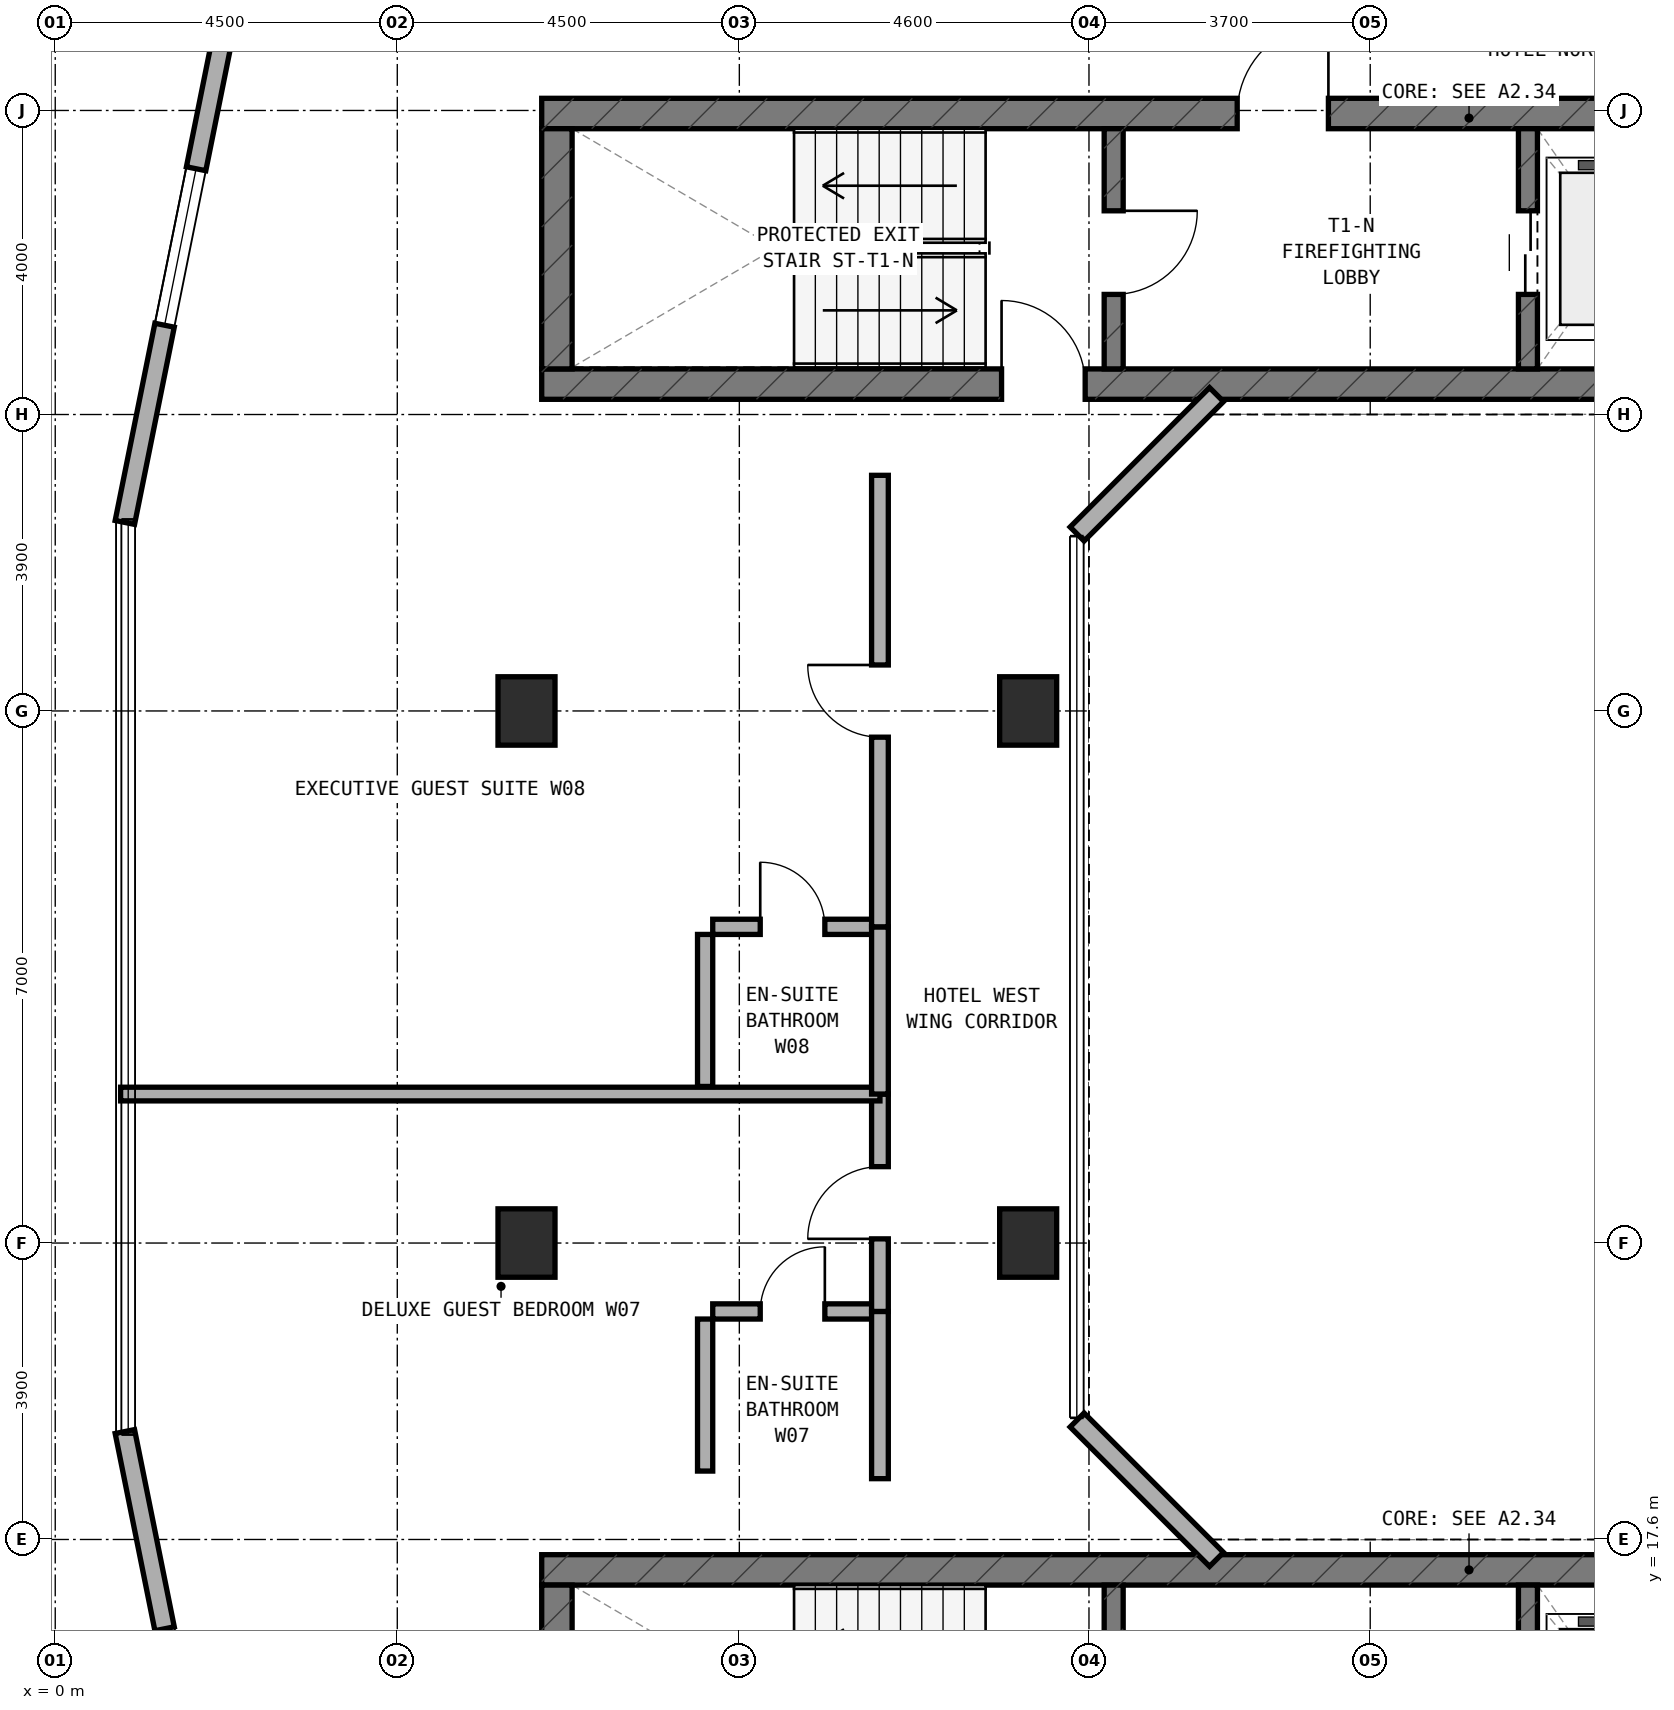
"""IFC4 building model, lengths in metres.
Left out: names, types, materials, properties, quantities, classifications, styles, units other than length and angle.
Written with IfcOpenShell. Run it as: python <this file> out.ifc"""

import sys

from ifc_helpers import new_model, si_unit, direction, frame, frame_2d, origin, origin_2d, place, context, subcontext, project, spatial, rectangle, extrude, element, fill, save


model = new_model("IFC4")
c1 = context("Model", 3, precision=1e-05, world=origin(), true_north=direction((0.0, 1.0)))
c2 = subcontext(c1, "Body", "Model", "MODEL_VIEW")
j1 = project(units=[si_unit("LENGTHUNIT", "METRE"), si_unit("PLANEANGLEUNIT", "RADIAN")], contexts=[c1])
p1 = place(None, origin())
s1 = spatial("IfcSite", under=j1, at=p1, CompositionType="ELEMENT")
p2 = place(p1, origin())
s2 = spatial("IfcBuilding", under=s1, at=p2, CompositionType="ELEMENT")
p3 = place(p2, frame((0.0, 0.0, 152.0)))
s3 = spatial("IfcBuildingStorey", under=s2, at=p3, CompositionType="ELEMENT", Elevation=152.0)
p4 = place(p3, frame((6.4, 32.8, 0.0), z_axis=(0.0, 0.0, 1.0), x_axis=(1.0, 0.0, 0.0)))
e1 = element("IfcWall", 1, at=p4, inside=s3, PredefinedType="SHEAR", context=c2, shape_type="SweptSolid", body=[
    extrude(rectangle(XDim=24.4, YDim=0.4, at=frame_2d((12.2, 0.0))), origin(), (0.0, 0.0, 1.0), 3.5),
])
p5 = place(p4, frame((6.05, 0.0, 0.0)))
e2 = element("IfcOpeningElement", 2, at=p5, cuts=e1, PredefinedType="OPENING", context=c2, shape_type="SweptSolid", body=[
    extrude(rectangle(XDim=1.1, YDim=2.15, at=frame_2d((0.55, 1.075))), frame((0.0, 0.21, 0.0), z_axis=(0.0, -1.0, 0.0), x_axis=(1.0, 0.0, 0.0)), (0.0, 0.0, 1.0), 0.42),
])
p6 = place(p3, frame((6.4, 36.36, 0.0), z_axis=(0.0, 0.0, 1.0), x_axis=(1.0, 0.0, 0.0)))
e3 = element("IfcWall", 3, at=p6, inside=s3, PredefinedType="SHEAR", context=c2, shape_type="SweptSolid", body=[
    extrude(rectangle(XDim=24.4, YDim=0.4, at=frame_2d((12.2, 0.0))), origin(), (0.0, 0.0, 1.0), 3.5),
])
p7 = place(p6, frame((9.15, 0.0, 0.0)))
e4 = element("IfcOpeningElement", 4, at=p7, cuts=e3, PredefinedType="OPENING", context=c2, shape_type="SweptSolid", body=[
    extrude(rectangle(XDim=1.2, YDim=2.15, at=frame_2d((0.6, 1.075))), frame((0.0, 0.21, 0.0), z_axis=(0.0, -1.0, 0.0), x_axis=(1.0, 0.0, 0.0)), (0.0, 0.0, 1.0), 0.42),
])
p8 = place(p6, frame((19.2, 0.0, 0.0)))
e5 = element("IfcOpeningElement", 5, at=p8, cuts=e3, PredefinedType="OPENING", context=c2, shape_type="SweptSolid", body=[
    extrude(rectangle(XDim=0.85, YDim=2.1, at=frame_2d((0.425, 1.05))), frame((0.0, 0.21, 0.0), z_axis=(0.0, -1.0, 0.0), x_axis=(1.0, 0.0, 0.0)), (0.0, 0.0, 1.0), 0.42),
])
p9 = place(p6, frame((16.94, 0.0, 0.0)))
e6 = element("IfcOpeningElement", 6, at=p9, cuts=e3, PredefinedType="OPENING", context=c2, shape_type="SweptSolid", body=[
    extrude(rectangle(XDim=0.85, YDim=2.1, at=frame_2d((0.425, 1.05))), frame((0.0, 0.21, 0.0), z_axis=(0.0, -1.0, 0.0), x_axis=(1.0, 0.0, 0.0)), (0.0, 0.0, 1.0), 0.42),
])
p10 = place(p3, frame((6.6, 33.0, 0.0), z_axis=(0.0, 0.0, 1.0), x_axis=(0.0, 1.0, 0.0)))
e7 = element("IfcWall", 7, at=p10, inside=s3, PredefinedType="SHEAR", context=c2, shape_type="SweptSolid", body=[
    extrude(rectangle(XDim=3.16, YDim=0.4, at=frame_2d((1.58, 0.0))), origin(), (0.0, 0.0, 1.0), 3.5),
])
p11 = place(p3, frame((13.925, 33.0, 0.0), z_axis=(0.0, 0.0, 1.0), x_axis=(0.0, 1.0, 0.0)))
e8 = element("IfcWall", 8, at=p11, inside=s3, PredefinedType="STANDARD", context=c2, shape_type="SweptSolid", body=[
    extrude(rectangle(XDim=3.16, YDim=0.25, at=frame_2d((1.58, 0.0))), origin(), (0.0, 0.0, 1.0), 3.22),
])
p12 = place(p11, frame((0.98, 0.0, 0.0)))
e9 = element("IfcOpeningElement", 9, at=p12, cuts=e8, PredefinedType="OPENING", context=c2, shape_type="SweptSolid", body=[
    extrude(rectangle(XDim=1.1, YDim=2.15, at=frame_2d((0.55, 1.075))), frame((0.0, 0.135, 0.0), z_axis=(0.0, -1.0, 0.0), x_axis=(1.0, 0.0, 0.0)), (0.0, 0.0, 1.0), 0.27),
])
p13 = place(p3, frame((19.375, 33.0, 0.0), z_axis=(0.0, 0.0, 1.0), x_axis=(0.0, 1.0, 0.0)))
e10 = element("IfcWall", 10, at=p13, inside=s3, PredefinedType="STANDARD", context=c2, shape_type="SweptSolid", body=[
    extrude(rectangle(XDim=3.16, YDim=0.25, at=frame_2d((1.58, 0.0))), origin(), (0.0, 0.0, 1.0), 3.22),
])
p14 = place(p13, frame((0.98, 0.0, 0.0)))
e11 = element("IfcOpeningElement", 11, at=p14, cuts=e10, PredefinedType="OPENING", context=c2, shape_type="SweptSolid", body=[
    extrude(rectangle(XDim=1.1, YDim=2.15, at=frame_2d((0.55, 1.075))), frame((0.0, 0.135, 0.0), z_axis=(0.0, -1.0, 0.0), x_axis=(1.0, 0.0, 0.0)), (0.0, 0.0, 1.0), 0.27),
])
p15 = place(p3, frame((6.4, 17.2, 0.0), z_axis=(0.0, 0.0, 1.0), x_axis=(1.0, 0.0, 0.0)))
e12 = element("IfcWall", 12, at=p15, inside=s3, PredefinedType="SHEAR", context=c2, shape_type="SweptSolid", body=[
    extrude(rectangle(XDim=24.4, YDim=0.4, at=frame_2d((12.2, 0.0))), origin(), (0.0, 0.0, 1.0), 3.5),
])
p16 = place(p3, frame((6.6, 13.84, 0.0), z_axis=(0.0, 0.0, 1.0), x_axis=(0.0, 1.0, 0.0)))
e13 = element("IfcWall", 13, at=p16, inside=s3, PredefinedType="SHEAR", context=c2, shape_type="SweptSolid", body=[
    extrude(rectangle(XDim=3.16, YDim=0.4, at=frame_2d((1.58, 0.0))), origin(), (0.0, 0.0, 1.0), 3.5),
])
p17 = place(p3, frame((13.925, 13.84, 0.0), z_axis=(0.0, 0.0, 1.0), x_axis=(0.0, 1.0, 0.0)))
e14 = element("IfcWall", 14, at=p17, inside=s3, PredefinedType="STANDARD", context=c2, shape_type="SweptSolid", body=[
    extrude(rectangle(XDim=3.16, YDim=0.25, at=frame_2d((1.58, 0.0))), origin(), (0.0, 0.0, 1.0), 3.22),
])
p18 = place(p17, frame((0.98, 0.0, 0.0)))
e15 = element("IfcOpeningElement", 15, at=p18, cuts=e14, PredefinedType="OPENING", context=c2, shape_type="SweptSolid", body=[
    extrude(rectangle(XDim=1.1, YDim=2.15, at=frame_2d((0.55, 1.075))), frame((0.0, 0.135, 0.0), z_axis=(0.0, -1.0, 0.0), x_axis=(1.0, 0.0, 0.0)), (0.0, 0.0, 1.0), 0.27),
])
p19 = place(p3, frame((19.375, 13.84, 0.0), z_axis=(0.0, 0.0, 1.0), x_axis=(0.0, 1.0, 0.0)))
e16 = element("IfcWall", 16, at=p19, inside=s3, PredefinedType="STANDARD", context=c2, shape_type="SweptSolid", body=[
    extrude(rectangle(XDim=3.16, YDim=0.25, at=frame_2d((1.58, 0.0))), origin(), (0.0, 0.0, 1.0), 3.22),
])
p20 = place(p19, frame((0.98, 0.0, 0.0)))
e17 = element("IfcOpeningElement", 17, at=p20, cuts=e16, PredefinedType="OPENING", context=c2, shape_type="SweptSolid", body=[
    extrude(rectangle(XDim=1.1, YDim=2.15, at=frame_2d((0.55, 1.075))), frame((0.0, 0.135, 0.0), z_axis=(0.0, -1.0, 0.0), x_axis=(1.0, 0.0, 0.0)), (0.0, 0.0, 1.0), 0.27),
])
for number, where, z_axis, x_axis in (
    (18, (6.2, 21.5, 0.0), (0.0, 0.0, 1.0), (1.0, 0.0, 0.0)),
    (19, (6.2, 28.5, 0.0), (0.0, 0.0, 1.0), (1.0, 0.0, 0.0)),
    (20, (12.8, 21.5, 0.0), (0.0, 0.0, 1.0), (1.0, 0.0, 0.0)),
    (21, (12.8, 28.5, 0.0), (0.0, 0.0, 1.0), (1.0, 0.0, 0.0)),
):
    element("IfcColumn", number, at=place(p3, frame(where, z_axis=z_axis, x_axis=x_axis)), inside=s3, PredefinedType="COLUMN", context=c2, shape_type="SweptSolid", body=[
        extrude(rectangle(XDim=0.75, YDim=0.9, at=origin_2d()), origin(), (0.0, 0.0, 1.0), 3.5),
    ])
p21 = place(p3, frame((2.729, 39.982, 0.0), z_axis=(0.0, 0.0, 1.0), x_axis=(-0.197435082048, -0.980315963543, 0.0)))
e22 = element("IfcWall", 22, at=p21, inside=s3, PredefinedType="STANDARD", context=c2, shape_type="SweptSolid", body=[
    extrude(rectangle(XDim=9.183, YDim=0.26, at=frame_2d((4.591, 0.0))), origin(), (0.0, 0.0, 1.0), 3.22),
])
p22 = place(p21, frame((4.436, 0.0, 0.85)))
e23 = element("IfcOpeningElement", 23, at=p22, cuts=e22, PredefinedType="OPENING", context=c2, shape_type="SweptSolid", body=[
    extrude(rectangle(XDim=2.1, YDim=1.5, at=frame_2d((1.05, 0.75))), frame((0.0, 0.14, 0.0), z_axis=(0.0, -1.0, 0.0), x_axis=(1.0, 0.0, 0.0)), (0.0, 0.0, 1.0), 0.28),
])
p23 = place(p3, frame((0.916, 19.02, 0.0), z_axis=(0.0, 0.0, 1.0), x_axis=(0.197435082048, -0.980315963543, 0.0)))
e24 = element("IfcWall", 24, at=p23, inside=s3, PredefinedType="STANDARD", context=c2, shape_type="SweptSolid", body=[
    extrude(rectangle(XDim=9.183, YDim=0.26, at=frame_2d((4.591, 0.0))), origin(), (0.0, 0.0, 1.0), 3.22),
])
p24 = place(p23, frame((2.647, 0.0, 0.85)))
e25 = element("IfcOpeningElement", 25, at=p24, cuts=e24, PredefinedType="OPENING", context=c2, shape_type="SweptSolid", body=[
    extrude(rectangle(XDim=2.1, YDim=1.5, at=frame_2d((1.05, 0.75))), frame((0.0, 0.14, 0.0), z_axis=(0.0, -1.0, 0.0), x_axis=(1.0, 0.0, 0.0)), (0.0, 0.0, 1.0), 0.28),
])
for number, where, z_axis, x_axis in (
    (26, (15.278, 32.662, 0.0), (0.0, 0.0, 1.0), (-0.707, -0.707, 0.0)),
    (27, (13.444, 19.172, 0.0), (0.0, 0.0, 1.0), (0.707, -0.707, 0.0)),
):
    element("IfcWall", number, at=place(p3, frame(where, z_axis=z_axis, x_axis=x_axis)), inside=s3, PredefinedType="STANDARD", context=c2, shape_type="SweptSolid", body=[
        extrude(rectangle(XDim=2.594, YDim=0.26, at=frame_2d((1.297, 0.0))), origin(), (0.0, 0.0, 1.0), 3.22),
    ])
p25 = place(p3, frame((8.65, 20.6, 0.0), z_axis=(0.0, 0.0, 1.0), x_axis=(1.0, 0.0, 0.0)))
e28 = element("IfcWall", 28, at=p25, inside=s3, PredefinedType="PLUMBINGWALL", context=c2, shape_type="SweptSolid", body=[
    extrude(rectangle(XDim=2.1, YDim=0.2, at=frame_2d((1.05, 0.0))), origin(), (0.0, 0.0, 1.0), 3.22),
])
p26 = place(p25, frame((0.625, 0.0, 0.0)))
e29 = element("IfcOpeningElement", 29, at=p26, cuts=e28, PredefinedType="OPENING", context=c2, shape_type="SweptSolid", body=[
    extrude(rectangle(XDim=0.85, YDim=2.1, at=frame_2d((0.425, 1.05))), frame((0.0, 0.11, 0.0), z_axis=(0.0, -1.0, 0.0), x_axis=(1.0, 0.0, 0.0)), (0.0, 0.0, 1.0), 0.22),
])
p27 = place(p3, frame((8.55, 18.5, 0.0), z_axis=(0.0, 0.0, 1.0), x_axis=(0.0, 1.0, 0.0)))
e30 = element("IfcWall", 30, at=p27, inside=s3, PredefinedType="PLUMBINGWALL", context=c2, shape_type="SweptSolid", body=[
    extrude(rectangle(XDim=2.0, YDim=0.2, at=frame_2d((1.0, 0.0))), origin(), (0.0, 0.0, 1.0), 3.22),
])
p28 = place(p3, frame((10.85, 18.4, 0.0), z_axis=(0.0, 0.0, 1.0), x_axis=(0.0, 1.0, 0.0)))
e31 = element("IfcWall", 31, at=p28, inside=s3, PredefinedType="SOLIDWALL", context=c2, shape_type="SweptSolid", body=[
    extrude(rectangle(XDim=2.2, YDim=0.22, at=frame_2d((1.1, 0.0))), origin(), (0.0, 0.0, 1.0), 3.22),
])
p29 = place(p3, frame((10.85, 20.6, 0.0), z_axis=(0.0, 0.0, 1.0), x_axis=(0.0, 1.0, 0.0)))
e32 = element("IfcWall", 32, at=p29, inside=s3, PredefinedType="SOLIDWALL", context=c2, shape_type="SweptSolid", body=[
    extrude(rectangle(XDim=2.86, YDim=0.22, at=frame_2d((1.43, 0.0))), origin(), (0.0, 0.0, 1.0), 2.795),
])
p30 = place(p29, frame((0.955, 0.0, 0.0)))
e33 = element("IfcOpeningElement", 33, at=p30, cuts=e32, PredefinedType="OPENING", context=c2, shape_type="SweptSolid", body=[
    extrude(rectangle(XDim=0.95, YDim=2.1, at=frame_2d((0.475, 1.05))), frame((0.0, 0.12, 0.0), z_axis=(0.0, -1.0, 0.0), x_axis=(1.0, 0.0, 0.0)), (0.0, 0.0, 1.0), 0.24),
])
p31 = place(p3, frame((0.86, 23.46, 0.0), z_axis=(0.0, 0.0, 1.0), x_axis=(1.0, 0.0, 0.0)))
e34 = element("IfcWall", 34, at=p31, inside=s3, PredefinedType="SOLIDWALL", context=c2, shape_type="SweptSolid", body=[
    extrude(rectangle(XDim=9.99, YDim=0.18, at=frame_2d((4.995, 0.0))), origin(), (0.0, 0.0, 1.0), 2.835),
])
p32 = place(p3, frame((8.65, 25.66, 0.0), z_axis=(0.0, 0.0, 1.0), x_axis=(1.0, 0.0, 0.0)))
e35 = element("IfcWall", 35, at=p32, inside=s3, PredefinedType="PLUMBINGWALL", context=c2, shape_type="SweptSolid", body=[
    extrude(rectangle(XDim=2.1, YDim=0.2, at=frame_2d((1.05, 0.0))), origin(), (0.0, 0.0, 1.0), 3.22),
])
p33 = place(p32, frame((0.625, 0.0, 0.0)))
e36 = element("IfcOpeningElement", 36, at=p33, cuts=e35, PredefinedType="OPENING", context=c2, shape_type="SweptSolid", body=[
    extrude(rectangle(XDim=0.85, YDim=2.1, at=frame_2d((0.425, 1.05))), frame((0.0, 0.11, 0.0), z_axis=(0.0, -1.0, 0.0), x_axis=(1.0, 0.0, 0.0)), (0.0, 0.0, 1.0), 0.22),
])
p34 = place(p3, frame((8.55, 23.56, 0.0), z_axis=(0.0, 0.0, 1.0), x_axis=(0.0, 1.0, 0.0)))
e37 = element("IfcWall", 37, at=p34, inside=s3, PredefinedType="PLUMBINGWALL", context=c2, shape_type="SweptSolid", body=[
    extrude(rectangle(XDim=2.0, YDim=0.2, at=frame_2d((1.0, 0.0))), origin(), (0.0, 0.0, 1.0), 3.22),
])
p35 = place(p3, frame((10.85, 23.46, 0.0), z_axis=(0.0, 0.0, 1.0), x_axis=(0.0, 1.0, 0.0)))
e38 = element("IfcWall", 38, at=p35, inside=s3, PredefinedType="SOLIDWALL", context=c2, shape_type="SweptSolid", body=[
    extrude(rectangle(XDim=2.2, YDim=0.22, at=frame_2d((1.1, 0.0))), origin(), (0.0, 0.0, 1.0), 3.22),
])
p36 = place(p3, frame((10.85, 25.66, 0.0), z_axis=(0.0, 0.0, 1.0), x_axis=(0.0, 1.0, 0.0)))
e39 = element("IfcWall", 39, at=p36, inside=s3, PredefinedType="SOLIDWALL", context=c2, shape_type="SweptSolid", body=[
    extrude(rectangle(XDim=5.94, YDim=0.22, at=frame_2d((2.97, 0.0))), origin(), (0.0, 0.0, 1.0), 2.795),
])
p37 = place(p36, frame((2.495, 0.0, 0.0)))
e40 = element("IfcOpeningElement", 40, at=p37, cuts=e39, PredefinedType="OPENING", context=c2, shape_type="SweptSolid", body=[
    extrude(rectangle(XDim=0.95, YDim=2.1, at=frame_2d((0.475, 1.05))), frame((0.0, 0.12, 0.0), z_axis=(0.0, -1.0, 0.0), x_axis=(1.0, 0.0, 0.0)), (0.0, 0.0, 1.0), 0.24),
])
p38 = place(p22, origin())
e41 = element("IfcWindow", 41, at=p38, inside=s3, PartitioningType="SINGLE_PANEL", PredefinedType="WINDOW", context=c2, shape_type="SweptSolid", body=[
    extrude(rectangle(XDim=2.1, YDim=1.5, at=frame_2d((1.05, 0.75))), frame((0.0, 0.03, 0.0), z_axis=(0.0, -1.0, 0.0), x_axis=(1.0, 0.0, 0.0)), (0.0, 0.0, 1.0), 0.06),
])
fill(e23, e41)
p39 = place(p24, origin())
e42 = element("IfcWindow", 42, at=p39, inside=s3, PartitioningType="SINGLE_PANEL", PredefinedType="WINDOW", context=c2, shape_type="SweptSolid", body=[
    extrude(rectangle(XDim=2.1, YDim=1.5, at=frame_2d((1.05, 0.75))), frame((0.0, 0.03, 0.0), z_axis=(0.0, -1.0, 0.0), x_axis=(1.0, 0.0, 0.0)), (0.0, 0.0, 1.0), 0.06),
])
fill(e25, e42)
p40 = place(p12, frame((1.1, 0.0, 0.0), z_axis=(0.0, 0.0, 1.0), x_axis=(-1.0, 0.0, 0.0)))
e43 = element("IfcDoor", 43, at=p40, inside=s3, OperationType="SINGLE_SWING_LEFT", PredefinedType="DOOR", context=c2, shape_type="SweptSolid", body=[
    extrude(rectangle(XDim=1.1, YDim=2.15, at=frame_2d((0.55, 1.075))), frame((0.0, 0.025, 0.0), z_axis=(0.0, -1.0, 0.0), x_axis=(1.0, 0.0, 0.0)), (0.0, 0.0, 1.0), 0.05),
])
fill(e9, e43)
p41 = place(p7, origin())
e44 = element("IfcDoor", 44, at=p41, inside=s3, OperationType="SINGLE_SWING_RIGHT", PredefinedType="DOOR", context=c2, shape_type="SweptSolid", body=[
    extrude(rectangle(XDim=1.2, YDim=2.15, at=frame_2d((0.6, 1.075))), frame((0.0, 0.025, 0.0), z_axis=(0.0, -1.0, 0.0), x_axis=(1.0, 0.0, 0.0)), (0.0, 0.0, 1.0), 0.05),
])
fill(e4, e44)
p42 = place(p14, origin())
e45 = element("IfcDoor", 45, at=p42, inside=s3, OperationType="DOUBLE_DOOR_SLIDING", PredefinedType="DOOR", context=c2, shape_type="SweptSolid", body=[
    extrude(rectangle(XDim=1.1, YDim=2.15, at=frame_2d((0.55, 1.075))), frame((0.0, 0.025, 0.0), z_axis=(0.0, -1.0, 0.0), x_axis=(1.0, 0.0, 0.0)), (0.0, 0.0, 1.0), 0.05),
])
fill(e11, e45)
p43 = place(p5, origin())
e46 = element("IfcDoor", 46, at=p43, inside=s3, OperationType="SINGLE_SWING_LEFT", PredefinedType="DOOR", context=c2, shape_type="SweptSolid", body=[
    extrude(rectangle(XDim=1.1, YDim=2.15, at=frame_2d((0.55, 1.075))), frame((0.0, 0.025, 0.0), z_axis=(0.0, -1.0, 0.0), x_axis=(1.0, 0.0, 0.0)), (0.0, 0.0, 1.0), 0.05),
])
fill(e2, e46)
p44 = place(p26, origin())
e47 = element("IfcDoor", 47, at=p44, inside=s3, OperationType="SINGLE_SWING_RIGHT", PredefinedType="DOOR", context=c2, shape_type="SweptSolid", body=[
    extrude(rectangle(XDim=0.85, YDim=2.1, at=frame_2d((0.425, 1.05))), frame((0.0, 0.025, 0.0), z_axis=(0.0, -1.0, 0.0), x_axis=(1.0, 0.0, 0.0)), (0.0, 0.0, 1.0), 0.05),
])
fill(e29, e47)
p45 = place(p30, origin())
e48 = element("IfcDoor", 48, at=p45, inside=s3, OperationType="SINGLE_SWING_LEFT", PredefinedType="DOOR", context=c2, shape_type="SweptSolid", body=[
    extrude(rectangle(XDim=0.95, YDim=2.1, at=frame_2d((0.475, 1.05))), frame((0.0, 0.025, 0.0), z_axis=(0.0, -1.0, 0.0), x_axis=(1.0, 0.0, 0.0)), (0.0, 0.0, 1.0), 0.05),
])
fill(e33, e48)
p46 = place(p33, origin())
e49 = element("IfcDoor", 49, at=p46, inside=s3, OperationType="SINGLE_SWING_LEFT", PredefinedType="DOOR", context=c2, shape_type="SweptSolid", body=[
    extrude(rectangle(XDim=0.85, YDim=2.1, at=frame_2d((0.425, 1.05))), frame((0.0, 0.025, 0.0), z_axis=(0.0, -1.0, 0.0), x_axis=(1.0, 0.0, 0.0)), (0.0, 0.0, 1.0), 0.05),
])
fill(e36, e49)
p47 = place(p37, origin())
e50 = element("IfcDoor", 50, at=p47, inside=s3, OperationType="SINGLE_SWING_RIGHT", PredefinedType="DOOR", context=c2, shape_type="SweptSolid", body=[
    extrude(rectangle(XDim=0.95, YDim=2.1, at=frame_2d((0.475, 1.05))), frame((0.0, 0.025, 0.0), z_axis=(0.0, -1.0, 0.0), x_axis=(1.0, 0.0, 0.0)), (0.0, 0.0, 1.0), 0.05),
])
fill(e40, e50)
save(model, sys.argv[1])
